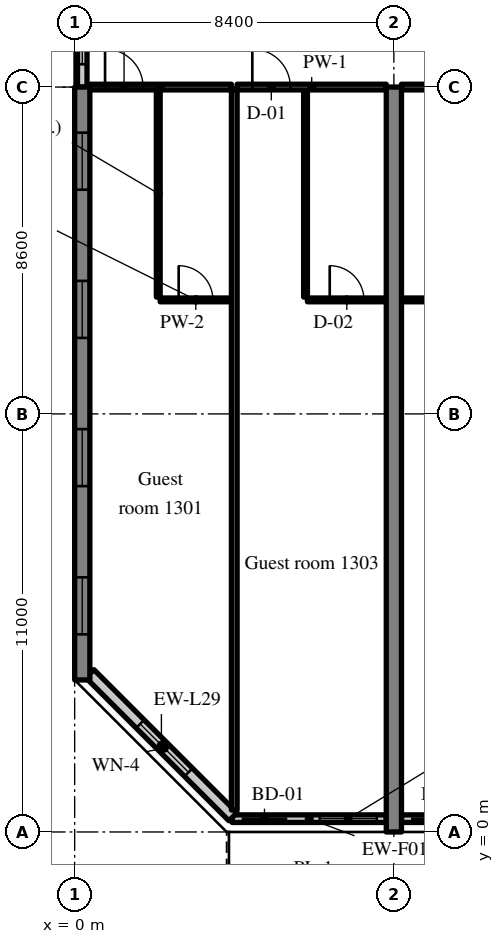
"""IFC4 building model, lengths in metres.
Left out: names, types, materials, properties, quantities, classifications, styles, units other than length and angle.
Written with IfcOpenShell. Run it as: python <this file> out.ifc"""

import sys

from ifc_helpers import new_model, si_unit, direction, frame, frame_2d, origin, place, context, subcontext, project, spatial, rectangle, extrude, source, transform, mapped, element, fill, save


model = new_model("IFC4")
c1 = context("Model", 3, precision=1e-05, world=origin(), true_north=direction((0.0, 1.0)))
c2 = subcontext(c1, "Body", "Model", "MODEL_VIEW")
j1 = project(units=[si_unit("LENGTHUNIT", "METRE"), si_unit("PLANEANGLEUNIT", "RADIAN")], contexts=[c1])
p1 = place(None, origin())
s1 = spatial("IfcSite", under=j1, at=p1, CompositionType="ELEMENT")
p2 = place(p1, origin())
s2 = spatial("IfcBuilding", under=s1, at=p2, CompositionType="ELEMENT")
p3 = place(p2, frame((0.0, 0.0, 58.2)))
s3 = spatial("IfcBuildingStorey", under=s2, at=p3, CompositionType="ELEMENT", Elevation=58.2)
m1 = source(origin(), c2, "Body", "SweptSolid", [
    extrude(rectangle(XDim=15.6, YDim=0.4, at=frame_2d((7.8, 0.0))), origin(), (0.0, 0.0, 1.0), 3.52),
])
p4 = place(p3, frame((0.2, 4.0, 0.0), z_axis=(0.0, 0.0, 1.0), x_axis=(0.0, 1.0, 0.0)))
e1 = element("IfcWall", 1, at=p4, inside=s3, PredefinedType="SHEAR", context=c2, shape_type="MappedRepresentation", body=[
    mapped(m1, transform((0.0, 0.0, 0.0), scale=1.0)),
])
m2 = source(origin(), c2, "Body", "SweptSolid", [
    extrude(rectangle(XDim=1.5, YDim=1.5, at=frame_2d((0.75, 0.75))), frame((0.0, 0.21, 0.0), z_axis=(0.0, -1.0, 0.0), x_axis=(1.0, 0.0, 0.0)), (0.0, 0.0, 1.0), 0.42),
])
p5 = place(p4, frame((1.2, 0.0, 0.9)))
e2 = element("IfcOpeningElement", 2, at=p5, cuts=e1, PredefinedType="OPENING", context=c2, shape_type="MappedRepresentation", body=[
    mapped(m2, transform((0.0, 0.0, 0.0), scale=1.0)),
])
p6 = place(p4, frame((5.1, 0.0, 0.9)))
e3 = element("IfcOpeningElement", 3, at=p6, cuts=e1, PredefinedType="OPENING", context=c2, shape_type="MappedRepresentation", body=[
    mapped(m2, transform((0.0, 0.0, 0.0), scale=1.0)),
])
p7 = place(p4, frame((9.0, 0.0, 0.9)))
e4 = element("IfcOpeningElement", 4, at=p7, cuts=e1, PredefinedType="OPENING", context=c2, shape_type="MappedRepresentation", body=[
    mapped(m2, transform((0.0, 0.0, 0.0), scale=1.0)),
])
p8 = place(p4, frame((12.9, 0.0, 0.9)))
e5 = element("IfcOpeningElement", 5, at=p8, cuts=e1, PredefinedType="OPENING", context=c2, shape_type="MappedRepresentation", body=[
    mapped(m2, transform((0.0, 0.0, 0.0), scale=1.0)),
])
m3 = source(origin(), c2, "Body", "SweptSolid", [
    extrude(rectangle(XDim=19.6, YDim=0.4, at=frame_2d((9.8, 0.0))), origin(), (0.0, 0.0, 1.0), 3.52),
])
p9 = place(p3, frame((8.4, 0.0, 0.0), z_axis=(0.0, 0.0, 1.0), x_axis=(0.0, 1.0, 0.0)))
e6 = element("IfcWall", 6, at=p9, inside=s3, PredefinedType="SHEAR", context=c2, shape_type="MappedRepresentation", body=[
    mapped(m3, transform((0.0, 0.0, 0.0), scale=1.0)),
])
m4 = source(origin(), c2, "Body", "SweptSolid", [
    extrude(rectangle(XDim=4.055, YDim=0.2, at=frame_2d((2.027, 0.0))), origin(), (0.0, 0.0, 1.0), 2.82),
])
p10 = place(p3, frame((4.145, 0.35, 0.0), z_axis=(0.0, 0.0, 1.0), x_axis=(1.0, 0.0, 0.0)))
e7 = element("IfcWall", 7, at=p10, inside=s3, PredefinedType="SOLIDWALL", context=c2, shape_type="MappedRepresentation", body=[
    mapped(m4, transform((0.0, 0.0, 0.0), scale=1.0)),
])
m5 = source(origin(), c2, "Body", "SweptSolid", [
    extrude(rectangle(XDim=1.2, YDim=2.4, at=frame_2d((0.6, 1.2))), frame((0.0, 0.11, 0.0), z_axis=(0.0, -1.0, 0.0), x_axis=(1.0, 0.0, 0.0)), (0.0, 0.0, 1.0), 0.22),
])
p11 = place(p10, frame((0.25, 0.0, 0.0)))
e8 = element("IfcOpeningElement", 8, at=p11, cuts=e7, PredefinedType="OPENING", context=c2, shape_type="MappedRepresentation", body=[
    mapped(m5, transform((0.0, 0.0, 0.0), scale=1.0)),
])
m6 = source(origin(), c2, "Body", "SweptSolid", [
    extrude(rectangle(XDim=1.5, YDim=1.5, at=frame_2d((0.75, 0.75))), frame((0.0, 0.11, 0.0), z_axis=(0.0, -1.0, 0.0), x_axis=(1.0, 0.0, 0.0)), (0.0, 0.0, 1.0), 0.22),
])
p12 = place(p10, frame((2.305, 0.0, 0.9)))
e9 = element("IfcOpeningElement", 9, at=p12, cuts=e7, PredefinedType="OPENING", context=c2, shape_type="MappedRepresentation", body=[
    mapped(m6, transform((0.0, 0.0, 0.0), scale=1.0)),
])
m7 = source(origin(), c2, "Body", "SweptSolid", [
    extrude(rectangle(XDim=3.6, YDim=0.2, at=frame_2d((1.8, 0.0))), origin(), (0.0, 0.0, 1.0), 2.82),
])
p13 = place(p3, frame((8.6, 0.35, 0.0), z_axis=(0.0, 0.0, 1.0), x_axis=(1.0, 0.0, 0.0)))
e10 = element("IfcWall", 10, at=p13, inside=s3, PredefinedType="SOLIDWALL", context=c2, shape_type="MappedRepresentation", body=[
    mapped(m7, transform((0.0, 0.0, 0.0), scale=1.0)),
])
p14 = place(p13, frame((0.25, 0.0, 0.0)))
e11 = element("IfcOpeningElement", 11, at=p14, cuts=e10, PredefinedType="OPENING", context=c2, shape_type="MappedRepresentation", body=[
    mapped(m5, transform((0.0, 0.0, 0.0), scale=1.0)),
])
p15 = place(p13, frame((1.85, 0.0, 0.9)))
e12 = element("IfcOpeningElement", 12, at=p15, cuts=e10, PredefinedType="OPENING", context=c2, shape_type="MappedRepresentation", body=[
    mapped(m6, transform((0.0, 0.0, 0.0), scale=1.0)),
])
m8 = source(origin(), c2, "Body", "SweptSolid", [
    extrude(rectangle(XDim=5.326, YDim=0.3, at=frame_2d((2.663, 0.0))), origin(), (0.0, 0.0, 1.0), 3.52),
])
p16 = place(p3, frame((0.4, 4.166, 0.0), z_axis=(0.0, 0.0, 1.0), x_axis=(0.707106781187, -0.707106781187, 0.0)))
e13 = element("IfcWall", 13, at=p16, inside=s3, PredefinedType="SOLIDWALL", context=c2, shape_type="MappedRepresentation", body=[
    mapped(m8, transform((0.0, 0.0, 0.0), scale=1.0)),
])
m9 = source(origin(), c2, "Body", "SweptSolid", [
    extrude(rectangle(XDim=1.8, YDim=1.5, at=frame_2d((0.9, 0.75))), frame((0.0, 0.16, 0.0), z_axis=(0.0, -1.0, 0.0), x_axis=(1.0, 0.0, 0.0)), (0.0, 0.0, 1.0), 0.32),
])
p17 = place(p16, frame((1.871, 0.0, 0.9)))
e14 = element("IfcOpeningElement", 14, at=p17, cuts=e13, PredefinedType="OPENING", context=c2, shape_type="MappedRepresentation", body=[
    mapped(m9, transform((0.0, 0.0, 0.0), scale=1.0)),
])
m10 = source(origin(), c2, "Body", "SweptSolid", [
    extrude(rectangle(XDim=2.4, YDim=0.25, at=frame_2d((1.2, 0.0))), origin(), (0.0, 0.0, 1.0), 2.62),
])
p18 = place(p3, frame((0.2, 19.6, 0.0), z_axis=(0.0, 0.0, 1.0), x_axis=(0.0, 1.0, 0.0)))
e15 = element("IfcWall", 15, at=p18, inside=s3, PredefinedType="SOLIDWALL", context=c2, shape_type="MappedRepresentation", body=[
    mapped(m10, transform((0.0, 0.0, 0.0), scale=1.0)),
])
m11 = source(origin(), c2, "Body", "SweptSolid", [
    extrude(rectangle(XDim=1.2, YDim=1.5, at=frame_2d((0.6, 0.75))), frame((0.0, 0.135, 0.0), z_axis=(0.0, -1.0, 0.0), x_axis=(1.0, 0.0, 0.0)), (0.0, 0.0, 1.0), 0.27),
])
p19 = place(p18, frame((0.6, 0.0, 0.9)))
e16 = element("IfcOpeningElement", 16, at=p19, cuts=e15, PredefinedType="OPENING", context=c2, shape_type="MappedRepresentation", body=[
    mapped(m11, transform((0.0, 0.0, 0.0), scale=1.0)),
])
m12 = source(origin(), c2, "Body", "SweptSolid", [
    extrude(rectangle(XDim=5.45, YDim=0.1, at=frame_2d((2.725, 0.0))), origin(), (0.0, 0.0, 1.0), 3.52),
])
p20 = place(p3, frame((2.2, 14.075, 0.0), z_axis=(0.0, 0.0, 1.0), x_axis=(0.0, 1.0, 0.0)))
e17 = element("IfcWall", 17, at=p20, inside=s3, PredefinedType="PARTITIONING", context=c2, shape_type="MappedRepresentation", body=[
    mapped(m12, transform((0.0, 0.0, 0.0), scale=1.0)),
])
m13 = source(origin(), c2, "Body", "SweptSolid", [
    extrude(rectangle(XDim=1.875, YDim=0.1, at=frame_2d((0.938, 0.0))), origin(), (0.0, 0.0, 1.0), 3.52),
])
p21 = place(p3, frame((2.25, 14.0, 0.0), z_axis=(0.0, 0.0, 1.0), x_axis=(1.0, 0.0, 0.0)))
e18 = element("IfcWall", 18, at=p21, inside=s3, PredefinedType="PARTITIONING", context=c2, shape_type="MappedRepresentation", body=[
    mapped(m13, transform((0.0, 0.0, 0.0), scale=1.0)),
])
m14 = source(origin(), c2, "Body", "SweptSolid", [
    extrude(rectangle(XDim=0.9, YDim=2.1, at=frame_2d((0.45, 1.05))), frame((0.0, 0.06, 0.0), z_axis=(0.0, -1.0, 0.0), x_axis=(1.0, 0.0, 0.0)), (0.0, 0.0, 1.0), 0.12),
])
p22 = place(p21, frame((0.487, 0.0, 0.0)))
e19 = element("IfcOpeningElement", 19, at=p22, cuts=e18, PredefinedType="OPENING", context=c2, shape_type="MappedRepresentation", body=[
    mapped(m14, transform((0.0, 0.0, 0.0), scale=1.0)),
])
m15 = source(origin(), c2, "Body", "SweptSolid", [
    extrude(rectangle(XDim=3.725, YDim=0.15, at=frame_2d((1.863, 0.0))), origin(), (0.0, 0.0, 1.0), 2.82),
])
p23 = place(p3, frame((0.4, 19.6, 0.0), z_axis=(0.0, 0.0, 1.0), x_axis=(1.0, 0.0, 0.0)))
e20 = element("IfcWall", 20, at=p23, inside=s3, PredefinedType="PARTITIONING", context=c2, shape_type="MappedRepresentation", body=[
    mapped(m15, transform((0.0, 0.0, 0.0), scale=1.0)),
])
m16 = source(origin(), c2, "Body", "SweptSolid", [
    extrude(rectangle(XDim=1.0, YDim=2.1, at=frame_2d((0.5, 1.05))), frame((0.0, 0.085, 0.0), z_axis=(0.0, -1.0, 0.0), x_axis=(1.0, 0.0, 0.0)), (0.0, 0.0, 1.0), 0.17),
])
p24 = place(p23, frame((0.4, 0.0, 0.0)))
e21 = element("IfcOpeningElement", 21, at=p24, cuts=e20, PredefinedType="OPENING", context=c2, shape_type="MappedRepresentation", body=[
    mapped(m16, transform((0.0, 0.0, 0.0), scale=1.0)),
])
p25 = place(p3, frame((6.075, 14.075, 0.0), z_axis=(0.0, 0.0, 1.0), x_axis=(0.0, 1.0, 0.0)))
e22 = element("IfcWall", 22, at=p25, inside=s3, PredefinedType="PARTITIONING", context=c2, shape_type="MappedRepresentation", body=[
    mapped(m12, transform((0.0, 0.0, 0.0), scale=1.0)),
])
m17 = source(origin(), c2, "Body", "SweptSolid", [
    extrude(rectangle(XDim=2.075, YDim=0.1, at=frame_2d((1.038, 0.0))), origin(), (0.0, 0.0, 1.0), 3.52),
])
p26 = place(p3, frame((6.125, 14.0, 0.0), z_axis=(0.0, 0.0, 1.0), x_axis=(1.0, 0.0, 0.0)))
e23 = element("IfcWall", 23, at=p26, inside=s3, PredefinedType="PARTITIONING", context=c2, shape_type="MappedRepresentation", body=[
    mapped(m17, transform((0.0, 0.0, 0.0), scale=1.0)),
])
p27 = place(p26, frame((0.587, 0.0, 0.0)))
e24 = element("IfcOpeningElement", 24, at=p27, cuts=e23, PredefinedType="OPENING", context=c2, shape_type="MappedRepresentation", body=[
    mapped(m14, transform((0.0, 0.0, 0.0), scale=1.0)),
])
m18 = source(origin(), c2, "Body", "SweptSolid", [
    extrude(rectangle(XDim=3.925, YDim=0.15, at=frame_2d((1.962, 0.0))), origin(), (0.0, 0.0, 1.0), 2.82),
])
p28 = place(p3, frame((4.275, 19.6, 0.0), z_axis=(0.0, 0.0, 1.0), x_axis=(1.0, 0.0, 0.0)))
e25 = element("IfcWall", 25, at=p28, inside=s3, PredefinedType="PARTITIONING", context=c2, shape_type="MappedRepresentation", body=[
    mapped(m18, transform((0.0, 0.0, 0.0), scale=1.0)),
])
p29 = place(p28, frame((0.4, 0.0, 0.0)))
e26 = element("IfcOpeningElement", 26, at=p29, cuts=e25, PredefinedType="OPENING", context=c2, shape_type="MappedRepresentation", body=[
    mapped(m16, transform((0.0, 0.0, 0.0), scale=1.0)),
])
m19 = source(origin(), c2, "Body", "SweptSolid", [
    extrude(rectangle(XDim=18.947, YDim=0.15, at=frame_2d((9.474, 0.0))), origin(), (0.0, 0.0, 1.0), 3.52),
])
p30 = place(p3, frame((4.2, 0.578, 0.0), z_axis=(0.0, 0.0, 1.0), x_axis=(0.0, 1.0, 0.0)))
e27 = element("IfcWall", 27, at=p30, inside=s3, PredefinedType="PARTITIONING", context=c2, shape_type="MappedRepresentation", body=[
    mapped(m19, transform((0.0, 0.0, 0.0), scale=1.0)),
])
m20 = source(origin(), c2, "Body", "SweptSolid", [
    extrude(rectangle(XDim=2.55, YDim=0.1, at=frame_2d((1.275, 0.0))), origin(), (0.0, 0.0, 1.0), 3.52),
])
p31 = place(p3, frame((8.6, 14.0, 0.0), z_axis=(0.0, 0.0, 1.0), x_axis=(1.0, 0.0, 0.0)))
e28 = element("IfcWall", 28, at=p31, inside=s3, PredefinedType="PARTITIONING", context=c2, shape_type="MappedRepresentation", body=[
    mapped(m20, transform((0.0, 0.0, 0.0), scale=1.0)),
])
p32 = place(p31, frame((0.825, 0.0, 0.0)))
e29 = element("IfcOpeningElement", 29, at=p32, cuts=e28, PredefinedType="OPENING", context=c2, shape_type="MappedRepresentation", body=[
    mapped(m14, transform((0.0, 0.0, 0.0), scale=1.0)),
])
m21 = source(origin(), c2, "Body", "SweptSolid", [
    extrude(rectangle(XDim=8.0, YDim=0.15, at=frame_2d((4.0, 0.0))), origin(), (0.0, 0.0, 1.0), 2.82),
])
p33 = place(p3, frame((8.6, 19.6, 0.0), z_axis=(0.0, 0.0, 1.0), x_axis=(1.0, 0.0, 0.0)))
e30 = element("IfcWall", 30, at=p33, inside=s3, PredefinedType="PARTITIONING", context=c2, shape_type="MappedRepresentation", body=[
    mapped(m21, transform((0.0, 0.0, 0.0), scale=1.0)),
])
p34 = place(p33, frame((6.6, 0.0, 0.0)))
e31 = element("IfcOpeningElement", 31, at=p34, cuts=e30, PredefinedType="OPENING", context=c2, shape_type="MappedRepresentation", body=[
    mapped(m16, transform((0.0, 0.0, 0.0), scale=1.0)),
])
m22 = source(origin(), c2, "Body", "SweptSolid", [
    extrude(rectangle(XDim=1.2, YDim=2.4, at=frame_2d((0.6, 1.2))), frame((0.0, 0.025, 0.0), z_axis=(0.0, -1.0, 0.0), x_axis=(1.0, 0.0, 0.0)), (0.0, 0.0, 1.0), 0.05),
])
p35 = place(p11, origin())
e32 = element("IfcDoor", 32, at=p35, inside=s3, OperationType="SLIDING_TO_LEFT", PredefinedType="DOOR", context=c2, shape_type="MappedRepresentation", body=[
    mapped(m22, transform((0.0, 0.0, 0.0), scale=1.0)),
])
fill(e8, e32)
m23 = source(origin(), c2, "Body", "SweptSolid", [
    extrude(rectangle(XDim=1.5, YDim=1.5, at=frame_2d((0.75, 0.75))), frame((0.0, 0.03, 0.0), z_axis=(0.0, -1.0, 0.0), x_axis=(1.0, 0.0, 0.0)), (0.0, 0.0, 1.0), 0.06),
])
p36 = place(p12, origin())
e33 = element("IfcWindow", 33, at=p36, inside=s3, PartitioningType="SINGLE_PANEL", PredefinedType="WINDOW", context=c2, shape_type="MappedRepresentation", body=[
    mapped(m23, transform((0.0, 0.0, 0.0), scale=1.0)),
])
fill(e9, e33)
p37 = place(p14, origin())
e34 = element("IfcDoor", 34, at=p37, inside=s3, OperationType="SLIDING_TO_RIGHT", PredefinedType="DOOR", context=c2, shape_type="MappedRepresentation", body=[
    mapped(m22, transform((0.0, 0.0, 0.0), scale=1.0)),
])
fill(e11, e34)
m24 = source(origin(), c2, "Body", "SweptSolid", [
    extrude(rectangle(XDim=1.8, YDim=1.5, at=frame_2d((0.9, 0.75))), frame((0.0, 0.03, 0.0), z_axis=(0.0, -1.0, 0.0), x_axis=(1.0, 0.0, 0.0)), (0.0, 0.0, 1.0), 0.06),
])
p38 = place(p17, origin())
e35 = element("IfcWindow", 35, at=p38, inside=s3, PartitioningType="SINGLE_PANEL", PredefinedType="WINDOW", context=c2, shape_type="MappedRepresentation", body=[
    mapped(m24, transform((0.0, 0.0, 0.0), scale=1.0)),
])
fill(e14, e35)
p39 = place(p5, origin())
e36 = element("IfcWindow", 36, at=p39, inside=s3, PartitioningType="SINGLE_PANEL", PredefinedType="WINDOW", context=c2, shape_type="MappedRepresentation", body=[
    mapped(m23, transform((0.0, 0.0, 0.0), scale=1.0)),
])
fill(e2, e36)
p40 = place(p6, origin())
e37 = element("IfcWindow", 37, at=p40, inside=s3, PartitioningType="SINGLE_PANEL", PredefinedType="WINDOW", context=c2, shape_type="MappedRepresentation", body=[
    mapped(m23, transform((0.0, 0.0, 0.0), scale=1.0)),
])
fill(e3, e37)
p41 = place(p7, origin())
e38 = element("IfcWindow", 38, at=p41, inside=s3, PartitioningType="SINGLE_PANEL", PredefinedType="WINDOW", context=c2, shape_type="MappedRepresentation", body=[
    mapped(m23, transform((0.0, 0.0, 0.0), scale=1.0)),
])
fill(e4, e38)
p42 = place(p8, origin())
e39 = element("IfcWindow", 39, at=p42, inside=s3, PartitioningType="SINGLE_PANEL", PredefinedType="WINDOW", context=c2, shape_type="MappedRepresentation", body=[
    mapped(m23, transform((0.0, 0.0, 0.0), scale=1.0)),
])
fill(e5, e39)
m25 = source(origin(), c2, "Body", "SweptSolid", [
    extrude(rectangle(XDim=1.2, YDim=1.5, at=frame_2d((0.6, 0.75))), frame((0.0, 0.03, 0.0), z_axis=(0.0, -1.0, 0.0), x_axis=(1.0, 0.0, 0.0)), (0.0, 0.0, 1.0), 0.06),
])
p43 = place(p19, origin())
e40 = element("IfcWindow", 40, at=p43, inside=s3, PartitioningType="SINGLE_PANEL", PredefinedType="WINDOW", context=c2, shape_type="MappedRepresentation", body=[
    mapped(m25, transform((0.0, 0.0, 0.0), scale=1.0)),
])
fill(e16, e40)
m26 = source(origin(), c2, "Body", "SweptSolid", [
    extrude(rectangle(XDim=0.9, YDim=2.1, at=frame_2d((0.45, 1.05))), frame((0.0, 0.025, 0.0), z_axis=(0.0, -1.0, 0.0), x_axis=(1.0, 0.0, 0.0)), (0.0, 0.0, 1.0), 0.05),
])
p44 = place(p22, origin())
e41 = element("IfcDoor", 41, at=p44, inside=s3, OperationType="SINGLE_SWING_LEFT", PredefinedType="DOOR", context=c2, shape_type="MappedRepresentation", body=[
    mapped(m26, transform((0.0, 0.0, 0.0), scale=1.0)),
])
fill(e19, e41)
m27 = source(origin(), c2, "Body", "SweptSolid", [
    extrude(rectangle(XDim=1.0, YDim=2.1, at=frame_2d((0.5, 1.05))), frame((0.0, 0.025, 0.0), z_axis=(0.0, -1.0, 0.0), x_axis=(1.0, 0.0, 0.0)), (0.0, 0.0, 1.0), 0.05),
])
p45 = place(p24, origin())
e42 = element("IfcDoor", 42, at=p45, inside=s3, OperationType="SINGLE_SWING_LEFT", PredefinedType="DOOR", context=c2, shape_type="MappedRepresentation", body=[
    mapped(m27, transform((0.0, 0.0, 0.0), scale=1.0)),
])
fill(e21, e42)
p46 = place(p27, origin())
e43 = element("IfcDoor", 43, at=p46, inside=s3, OperationType="SINGLE_SWING_LEFT", PredefinedType="DOOR", context=c2, shape_type="MappedRepresentation", body=[
    mapped(m26, transform((0.0, 0.0, 0.0), scale=1.0)),
])
fill(e24, e43)
p47 = place(p29, origin())
e44 = element("IfcDoor", 44, at=p47, inside=s3, OperationType="SINGLE_SWING_LEFT", PredefinedType="DOOR", context=c2, shape_type="MappedRepresentation", body=[
    mapped(m27, transform((0.0, 0.0, 0.0), scale=1.0)),
])
fill(e26, e44)
save(model, sys.argv[1])
